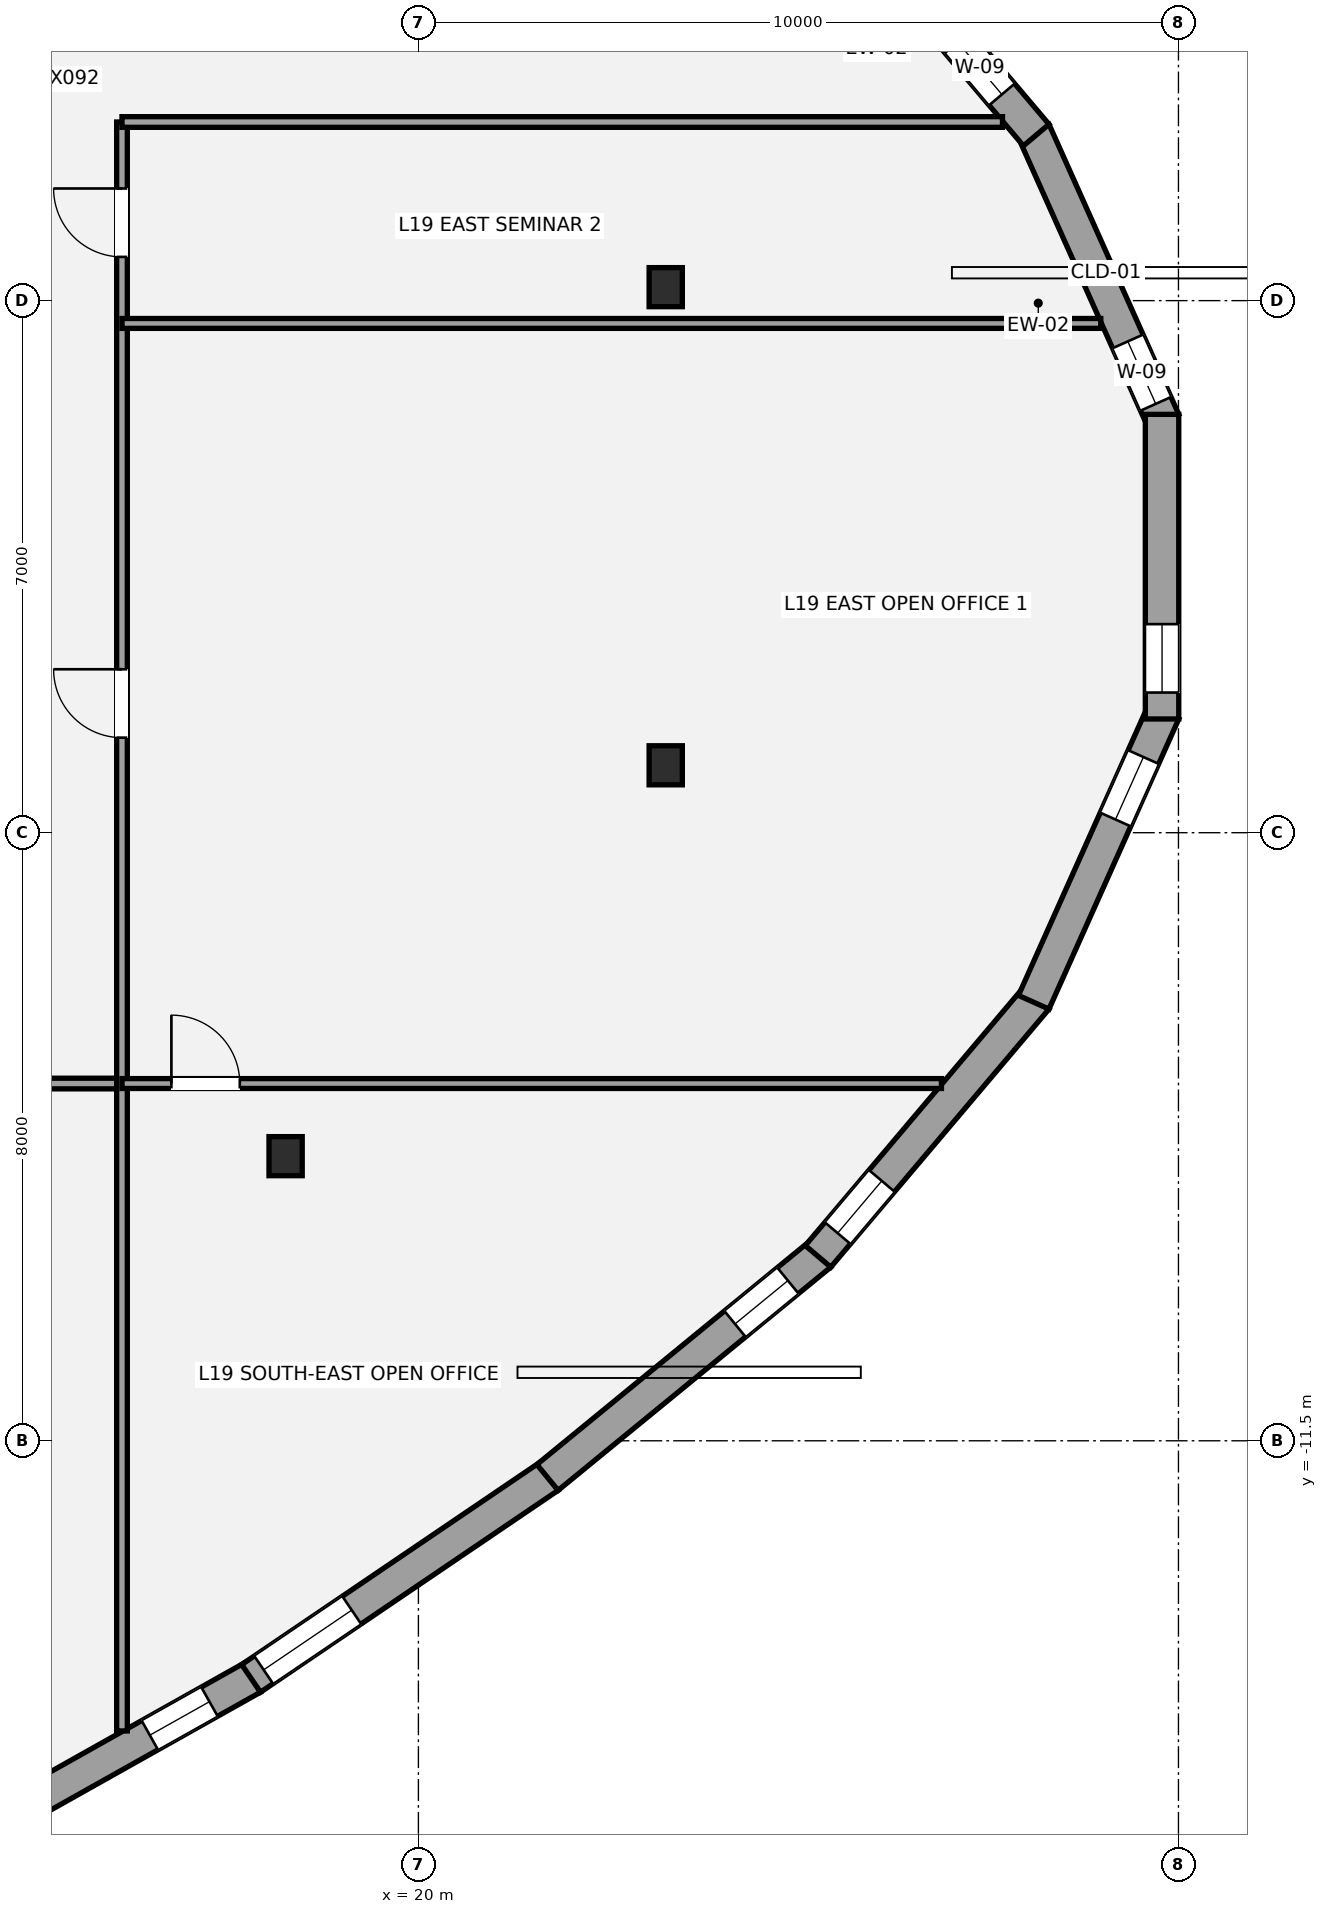
"""IFC4 building model, lengths in metres.
Left out: names, types, materials, properties, quantities, classifications, styles, units other than length and angle.
Written with IfcOpenShell. Run it as: python <this file> out.ifc"""

import sys

from ifc_helpers import new_model, si_unit, direction, frame, frame_2d, origin, origin_2d, place, context, subcontext, project, spatial, rectangle, i_section, extrude, element, fill, save


model = new_model("IFC4")
c1 = context("Model", 3, precision=1e-05, world=origin(), true_north=direction((0.0, 1.0)))
c2 = subcontext(c1, "Body", "Model", "MODEL_VIEW")
j1 = project(units=[si_unit("LENGTHUNIT", "METRE"), si_unit("PLANEANGLEUNIT", "RADIAN")], contexts=[c1])
p1 = place(None, origin())
s1 = spatial("IfcSite", under=j1, at=p1, CompositionType="ELEMENT")
p2 = place(p1, origin())
s2 = spatial("IfcBuilding", under=s1, at=p2, CompositionType="ELEMENT")
p3 = place(p2, frame((0.0, 0.0, 73.8)))
s3 = spatial("IfcBuildingStorey", under=s2, at=p3, CompositionType="ELEMENT", Elevation=73.8)
for number, where, z_axis, x_axis in (
    (1, (23.254, 3.677, 0.0), (0.0, 0.0, 1.0), (1.0, 0.0, 0.0)),
    (2, (18.253, -7.756, 0.0), (0.0, 0.0, 1.0), (1.0, 0.0, 0.0)),
    (3, (23.254, -2.613, 0.0), (0.0, 0.0, 1.0), (1.0, 0.0, 0.0)),
):
    element("IfcColumn", number, at=place(p3, frame(where, z_axis=z_axis, x_axis=x_axis)), inside=s3, PredefinedType="COLUMN", context=c2, shape_type="SweptSolid", body=[
        extrude(i_section(OverallWidth=0.437, OverallDepth=0.514, WebThickness=0.061, FlangeThickness=0.097, at=origin_2d()), origin(), (0.0, 0.0, 1.0), 3.6),
    ])
p4 = place(p3, frame((28.096, 5.731, 0.0), z_axis=(0.0, 0.0, 1.0), x_axis=(0.408380143708, -0.912811951184, 0.0)))
e4 = element("IfcWall", 4, at=p4, inside=s3, PredefinedType="STANDARD", context=c2, shape_type="SweptSolid", body=[
    extrude(rectangle(XDim=4.181, YDim=0.44, at=frame_2d((2.091, 0.0))), origin(), (0.0, 0.0, 1.0), 2.493),
])
p5 = place(p4, frame((3.031, 0.0, 0.58)))
e5 = element("IfcOpeningElement", 5, at=p5, cuts=e4, PredefinedType="OPENING", context=c2, shape_type="SweptSolid", body=[
    extrude(rectangle(XDim=0.9, YDim=1.35, at=frame_2d((0.45, 0.675))), frame((0.0, 0.23, 0.0), z_axis=(0.0, -1.0, 0.0), x_axis=(1.0, 0.0, 0.0)), (0.0, 0.0, 1.0), 0.46),
])
p6 = place(p3, frame((25.258, 9.073, 0.0), z_axis=(0.0, 0.0, 1.0), x_axis=(0.645698517297, -0.763592446767, 0.0)))
e6 = element("IfcWall", 6, at=p6, inside=s3, PredefinedType="STANDARD", context=c2, shape_type="SweptSolid", body=[
    extrude(rectangle(XDim=4.446, YDim=0.44, at=frame_2d((2.223, 0.0))), origin(), (0.0, 0.0, 1.0), 2.489),
])
p7 = place(p6, frame((2.847, 0.0, 0.58)))
e7 = element("IfcOpeningElement", 7, at=p7, cuts=e6, PredefinedType="OPENING", context=c2, shape_type="SweptSolid", body=[
    extrude(rectangle(XDim=0.9, YDim=1.35, at=frame_2d((0.45, 0.675))), frame((0.0, 0.23, 0.0), z_axis=(0.0, -1.0, 0.0), x_axis=(1.0, 0.0, 0.0)), (0.0, 0.0, 1.0), 0.46),
])
p8 = place(p3, frame((17.814, -14.616, 0.0), z_axis=(0.0, 0.0, 1.0), x_axis=(-0.871887714573, -0.489705843519, 0.0)))
e8 = element("IfcWall", 8, at=p8, inside=s3, PredefinedType="STANDARD", context=c2, shape_type="SweptSolid", body=[
    extrude(rectangle(XDim=4.968, YDim=0.44, at=frame_2d((2.484, 0.0))), origin(), (0.0, 0.0, 1.0), 2.489),
])
p9 = place(p8, frame((0.646, 0.0, 0.58)))
e9 = element("IfcOpeningElement", 9, at=p9, cuts=e8, PredefinedType="OPENING", context=c2, shape_type="SweptSolid", body=[
    extrude(rectangle(XDim=0.9, YDim=1.35, at=frame_2d((0.45, 0.675))), frame((0.0, 0.23, 0.0), z_axis=(0.0, -1.0, 0.0), x_axis=(1.0, 0.0, 0.0)), (0.0, 0.0, 1.0), 0.46),
])
p10 = place(p3, frame((21.715, -11.97, 0.0), z_axis=(0.0, 0.0, 1.0), x_axis=(-0.827650405372, -0.561243981249, 0.0)))
e10 = element("IfcWall", 10, at=p10, inside=s3, PredefinedType="STANDARD", context=c2, shape_type="SweptSolid", body=[
    extrude(rectangle(XDim=4.731, YDim=0.44, at=frame_2d((2.366, 0.0))), origin(), (0.0, 0.0, 1.0), 2.493),
])
p11 = place(p10, frame((3.132, 0.0, 0.45)))
e11 = element("IfcOpeningElement", 11, at=p11, cuts=e10, PredefinedType="OPENING", context=c2, shape_type="SweptSolid", body=[
    extrude(rectangle(XDim=1.4, YDim=1.55, at=frame_2d((0.7, 0.775))), frame((0.0, 0.23, 0.0), z_axis=(0.0, -1.0, 0.0), x_axis=(1.0, 0.0, 0.0)), (0.0, 0.0, 1.0), 0.46),
])
p12 = place(p3, frame((25.287, -9.045, 0.0), z_axis=(0.0, 0.0, 1.0), x_axis=(-0.7737766342, -0.63345853879, 0.0)))
e12 = element("IfcWall", 12, at=p12, inside=s3, PredefinedType="STANDARD", context=c2, shape_type="SweptSolid", body=[
    extrude(rectangle(XDim=4.637, YDim=0.44, at=frame_2d((2.318, 0.0))), origin(), (0.0, 0.0, 1.0), 2.489),
])
p13 = place(p12, frame((0.549, 0.0, 0.58)))
e13 = element("IfcOpeningElement", 13, at=p13, cuts=e12, PredefinedType="OPENING", context=c2, shape_type="SweptSolid", body=[
    extrude(rectangle(XDim=0.9, YDim=1.35, at=frame_2d((0.45, 0.675))), frame((0.0, 0.23, 0.0), z_axis=(0.0, -1.0, 0.0), x_axis=(1.0, 0.0, 0.0)), (0.0, 0.0, 1.0), 0.46),
])
p14 = place(p3, frame((28.129, -5.678, 0.0), z_axis=(0.0, 0.0, 1.0), x_axis=(-0.645698517297, -0.763592446767, 0.0)))
e14 = element("IfcWall", 14, at=p14, inside=s3, PredefinedType="STANDARD", context=c2, shape_type="SweptSolid", body=[
    extrude(rectangle(XDim=4.446, YDim=0.44, at=frame_2d((2.223, 0.0))), origin(), (0.0, 0.0, 1.0), 2.489),
])
p15 = place(p14, frame((3.146, 0.0, 0.58)))
e15 = element("IfcOpeningElement", 15, at=p15, cuts=e14, PredefinedType="OPENING", context=c2, shape_type="SweptSolid", body=[
    extrude(rectangle(XDim=0.9, YDim=1.35, at=frame_2d((0.45, 0.675))), frame((0.0, 0.23, 0.0), z_axis=(0.0, -1.0, 0.0), x_axis=(1.0, 0.0, 0.0)), (0.0, 0.0, 1.0), 0.46),
])
p16 = place(p3, frame((29.803, -1.914, 0.0), z_axis=(0.0, 0.0, 1.0), x_axis=(-0.408380143708, -0.912811951184, 0.0)))
e16 = element("IfcWall", 16, at=p16, inside=s3, PredefinedType="STANDARD", context=c2, shape_type="SweptSolid", body=[
    extrude(rectangle(XDim=4.181, YDim=0.44, at=frame_2d((2.091, 0.0))), origin(), (0.0, 0.0, 1.0), 2.493),
])
p17 = place(p16, frame((0.647, 0.0, 0.58)))
e17 = element("IfcOpeningElement", 17, at=p17, cuts=e16, PredefinedType="OPENING", context=c2, shape_type="SweptSolid", body=[
    extrude(rectangle(XDim=0.9, YDim=1.35, at=frame_2d((0.45, 0.675))), frame((0.0, 0.23, 0.0), z_axis=(0.0, -1.0, 0.0), x_axis=(1.0, 0.0, 0.0)), (0.0, 0.0, 1.0), 0.46),
])
p18 = place(p3, frame((29.784, 2.004, 0.0), z_axis=(0.0, 0.0, 1.0), x_axis=(0.0, -1.0, 0.0)))
e18 = element("IfcWall", 18, at=p18, inside=s3, PredefinedType="STANDARD", context=c2, shape_type="SweptSolid", body=[
    extrude(rectangle(XDim=4.008, YDim=0.44, at=frame_2d((2.004, 0.0))), origin(), (0.0, 0.0, 1.0), 2.493),
])
p19 = place(p18, frame((2.76, 0.0, 0.58)))
e19 = element("IfcOpeningElement", 19, at=p19, cuts=e18, PredefinedType="OPENING", context=c2, shape_type="SweptSolid", body=[
    extrude(rectangle(XDim=0.9, YDim=1.35, at=frame_2d((0.45, 0.675))), frame((0.0, 0.23, 0.0), z_axis=(0.0, -1.0, 0.0), x_axis=(1.0, 0.0, 0.0)), (0.0, 0.0, 1.0), 0.46),
])
p20 = place(p3, frame((-18.6, -6.8, 0.0), z_axis=(0.0, 0.0, 1.0), x_axis=(1.0, 0.0, 0.0)))
e20 = element("IfcWall", 20, at=p20, inside=s3, PredefinedType="PARTITIONING", context=c2, shape_type="SweptSolid", body=[
    extrude(rectangle(XDim=34.7, YDim=0.14, at=frame_2d((17.35, 0.0))), origin(), (0.0, 0.0, 1.0), 2.813),
])
p21 = place(p20, frame((4.35, 0.0, 0.0)))
e21 = element("IfcOpeningElement", 21, at=p21, cuts=e20, PredefinedType="OPENING", context=c2, shape_type="SweptSolid", body=[
    extrude(rectangle(XDim=0.9, YDim=2.1, at=frame_2d((0.45, 1.05))), frame((0.0, 0.08, 0.0), z_axis=(0.0, -1.0, 0.0), x_axis=(1.0, 0.0, 0.0)), (0.0, 0.0, 1.0), 0.16),
])
p22 = place(p20, frame((13.65, 0.0, 0.0)))
e22 = element("IfcOpeningElement", 22, at=p22, cuts=e20, PredefinedType="OPENING", context=c2, shape_type="SweptSolid", body=[
    extrude(rectangle(XDim=0.9, YDim=2.1, at=frame_2d((0.45, 1.05))), frame((0.0, 0.08, 0.0), z_axis=(0.0, -1.0, 0.0), x_axis=(1.0, 0.0, 0.0)), (0.0, 0.0, 1.0), 0.16),
])
p23 = place(p20, frame((22.65, 0.0, 0.0)))
e23 = element("IfcOpeningElement", 23, at=p23, cuts=e20, PredefinedType="OPENING", context=c2, shape_type="SweptSolid", body=[
    extrude(rectangle(XDim=0.9, YDim=2.1, at=frame_2d((0.45, 1.05))), frame((0.0, 0.08, 0.0), z_axis=(0.0, -1.0, 0.0), x_axis=(1.0, 0.0, 0.0)), (0.0, 0.0, 1.0), 0.16),
])
p24 = place(p20, frame((30.4, 0.0, 0.0)))
e24 = element("IfcOpeningElement", 24, at=p24, cuts=e20, PredefinedType="OPENING", context=c2, shape_type="SweptSolid", body=[
    extrude(rectangle(XDim=1.5, YDim=2.15, at=frame_2d((0.75, 1.075))), frame((0.0, 0.08, 0.0), z_axis=(0.0, -1.0, 0.0), x_axis=(1.0, 0.0, 0.0)), (0.0, 0.0, 1.0), 0.16),
])
p25 = place(p3, frame((16.1, -15.318, 0.0), z_axis=(0.0, 0.0, 1.0), x_axis=(0.0, 1.0, 0.0)))
e25 = element("IfcWall", 25, at=p25, inside=s3, PredefinedType="PARTITIONING", context=c2, shape_type="SweptSolid", body=[
    extrude(rectangle(XDim=21.168, YDim=0.14, at=frame_2d((10.584, 0.0))), origin(), (0.0, 0.0, 1.0), 2.801),
])
p26 = place(p25, frame((13.068, 0.0, 0.0)))
e26 = element("IfcOpeningElement", 26, at=p26, cuts=e25, PredefinedType="OPENING", context=c2, shape_type="SweptSolid", body=[
    extrude(rectangle(XDim=0.9, YDim=2.1, at=frame_2d((0.45, 1.05))), frame((0.0, 0.08, 0.0), z_axis=(0.0, -1.0, 0.0), x_axis=(1.0, 0.0, 0.0)), (0.0, 0.0, 1.0), 0.16),
])
p27 = place(p25, frame((19.393, 0.0, 0.0)))
e27 = element("IfcOpeningElement", 27, at=p27, cuts=e25, PredefinedType="OPENING", context=c2, shape_type="SweptSolid", body=[
    extrude(rectangle(XDim=0.9, YDim=2.1, at=frame_2d((0.45, 1.05))), frame((0.0, 0.08, 0.0), z_axis=(0.0, -1.0, 0.0), x_axis=(1.0, 0.0, 0.0)), (0.0, 0.0, 1.0), 0.16),
])
p28 = place(p3, frame((16.1, 5.85, 0.0), z_axis=(0.0, 0.0, 1.0), x_axis=(1.0, 0.0, 0.0)))
e28 = element("IfcWall", 28, at=p28, inside=s3, PredefinedType="PARTITIONING", context=c2, shape_type="SweptSolid", body=[
    extrude(rectangle(XDim=11.585, YDim=0.14, at=frame_2d((5.792, 0.0))), origin(), (0.0, 0.0, 1.0), 2.813),
])
p29 = place(p3, frame((16.1, -6.8, 0.0), z_axis=(0.0, 0.0, 1.0), x_axis=(1.0, 0.0, 0.0)))
e29 = element("IfcWall", 29, at=p29, inside=s3, PredefinedType="PARTITIONING", context=c2, shape_type="SweptSolid", body=[
    extrude(rectangle(XDim=10.781, YDim=0.13, at=frame_2d((5.391, 0.0))), origin(), (0.0, 0.0, 1.0), 2.739),
])
p30 = place(p29, frame((0.65, 0.0, 0.0)))
e30 = element("IfcOpeningElement", 30, at=p30, cuts=e29, PredefinedType="OPENING", context=c2, shape_type="SweptSolid", body=[
    extrude(rectangle(XDim=0.9, YDim=2.1, at=frame_2d((0.45, 1.05))), frame((0.0, 0.075, 0.0), z_axis=(0.0, -1.0, 0.0), x_axis=(1.0, 0.0, 0.0)), (0.0, 0.0, 1.0), 0.15),
])
p31 = place(p3, frame((16.1, 3.2, 0.0), z_axis=(0.0, 0.0, 1.0), x_axis=(1.0, 0.0, 0.0)))
e31 = element("IfcWall", 31, at=p31, inside=s3, PredefinedType="PARTITIONING", context=c2, shape_type="SweptSolid", body=[
    extrude(rectangle(XDim=12.878, YDim=0.13, at=frame_2d((6.439, 0.0))), origin(), (0.0, 0.0, 1.0), 2.801),
])
p32 = place(p5, origin())
e32 = element("IfcWindow", 32, at=p32, inside=s3, PartitioningType="SINGLE_PANEL", PredefinedType="WINDOW", context=c2, shape_type="SweptSolid", body=[
    extrude(rectangle(XDim=0.9, YDim=1.35, at=frame_2d((0.45, 0.675))), frame((0.0, -0.01, 0.0), z_axis=(0.0, -1.0, 0.0), x_axis=(1.0, 0.0, 0.0)), (0.0, 0.0, 1.0), 0.06),
])
fill(e5, e32)
p33 = place(p7, origin())
e33 = element("IfcWindow", 33, at=p33, inside=s3, PartitioningType="SINGLE_PANEL", PredefinedType="WINDOW", context=c2, shape_type="SweptSolid", body=[
    extrude(rectangle(XDim=0.9, YDim=1.35, at=frame_2d((0.45, 0.675))), frame((0.0, -0.01, 0.0), z_axis=(0.0, -1.0, 0.0), x_axis=(1.0, 0.0, 0.0)), (0.0, 0.0, 1.0), 0.06),
])
fill(e7, e33)
p34 = place(p9, origin())
e34 = element("IfcWindow", 34, at=p34, inside=s3, PartitioningType="SINGLE_PANEL", PredefinedType="WINDOW", context=c2, shape_type="SweptSolid", body=[
    extrude(rectangle(XDim=0.9, YDim=1.35, at=frame_2d((0.45, 0.675))), frame((0.0, -0.01, 0.0), z_axis=(0.0, -1.0, 0.0), x_axis=(1.0, 0.0, 0.0)), (0.0, 0.0, 1.0), 0.06),
])
fill(e9, e34)
p35 = place(p11, origin())
e35 = element("IfcWindow", 35, at=p35, inside=s3, PartitioningType="SINGLE_PANEL", PredefinedType="WINDOW", context=c2, shape_type="SweptSolid", body=[
    extrude(rectangle(XDim=1.4, YDim=1.55, at=frame_2d((0.7, 0.775))), frame((0.0, -0.01, 0.0), z_axis=(0.0, -1.0, 0.0), x_axis=(1.0, 0.0, 0.0)), (0.0, 0.0, 1.0), 0.06),
])
fill(e11, e35)
p36 = place(p13, origin())
e36 = element("IfcWindow", 36, at=p36, inside=s3, PartitioningType="SINGLE_PANEL", PredefinedType="WINDOW", context=c2, shape_type="SweptSolid", body=[
    extrude(rectangle(XDim=0.9, YDim=1.35, at=frame_2d((0.45, 0.675))), frame((0.0, -0.01, 0.0), z_axis=(0.0, -1.0, 0.0), x_axis=(1.0, 0.0, 0.0)), (0.0, 0.0, 1.0), 0.06),
])
fill(e13, e36)
p37 = place(p15, origin())
e37 = element("IfcWindow", 37, at=p37, inside=s3, PartitioningType="SINGLE_PANEL", PredefinedType="WINDOW", context=c2, shape_type="SweptSolid", body=[
    extrude(rectangle(XDim=0.9, YDim=1.35, at=frame_2d((0.45, 0.675))), frame((0.0, -0.01, 0.0), z_axis=(0.0, -1.0, 0.0), x_axis=(1.0, 0.0, 0.0)), (0.0, 0.0, 1.0), 0.06),
])
fill(e15, e37)
p38 = place(p17, origin())
e38 = element("IfcWindow", 38, at=p38, inside=s3, PartitioningType="SINGLE_PANEL", PredefinedType="WINDOW", context=c2, shape_type="SweptSolid", body=[
    extrude(rectangle(XDim=0.9, YDim=1.35, at=frame_2d((0.45, 0.675))), frame((0.0, -0.01, 0.0), z_axis=(0.0, -1.0, 0.0), x_axis=(1.0, 0.0, 0.0)), (0.0, 0.0, 1.0), 0.06),
])
fill(e17, e38)
p39 = place(p19, origin())
e39 = element("IfcWindow", 39, at=p39, inside=s3, PartitioningType="SINGLE_PANEL", PredefinedType="WINDOW", context=c2, shape_type="SweptSolid", body=[
    extrude(rectangle(XDim=0.9, YDim=1.35, at=frame_2d((0.45, 0.675))), frame((0.0, -0.01, 0.0), z_axis=(0.0, -1.0, 0.0), x_axis=(1.0, 0.0, 0.0)), (0.0, 0.0, 1.0), 0.06),
])
fill(e19, e39)
p40 = place(p30, origin())
e40 = element("IfcDoor", 40, at=p40, inside=s3, OperationType="SINGLE_SWING_LEFT", PredefinedType="DOOR", context=c2, shape_type="SweptSolid", body=[
    extrude(rectangle(XDim=0.9, YDim=2.1, at=frame_2d((0.45, 1.05))), frame((0.0, 0.025, 0.0), z_axis=(0.0, -1.0, 0.0), x_axis=(1.0, 0.0, 0.0)), (0.0, 0.0, 1.0), 0.05),
])
fill(e30, e40)
p41 = place(p26, origin())
e41 = element("IfcDoor", 41, at=p41, inside=s3, OperationType="SINGLE_SWING_RIGHT", PredefinedType="DOOR", context=c2, shape_type="SweptSolid", body=[
    extrude(rectangle(XDim=0.9, YDim=2.1, at=frame_2d((0.45, 1.05))), frame((0.0, 0.025, 0.0), z_axis=(0.0, -1.0, 0.0), x_axis=(1.0, 0.0, 0.0)), (0.0, 0.0, 1.0), 0.05),
])
fill(e26, e41)
p42 = place(p27, origin())
e42 = element("IfcDoor", 42, at=p42, inside=s3, OperationType="SINGLE_SWING_RIGHT", PredefinedType="DOOR", context=c2, shape_type="SweptSolid", body=[
    extrude(rectangle(XDim=0.9, YDim=2.1, at=frame_2d((0.45, 1.05))), frame((0.0, 0.025, 0.0), z_axis=(0.0, -1.0, 0.0), x_axis=(1.0, 0.0, 0.0)), (0.0, 0.0, 1.0), 0.05),
])
fill(e27, e42)
save(model, sys.argv[1])
